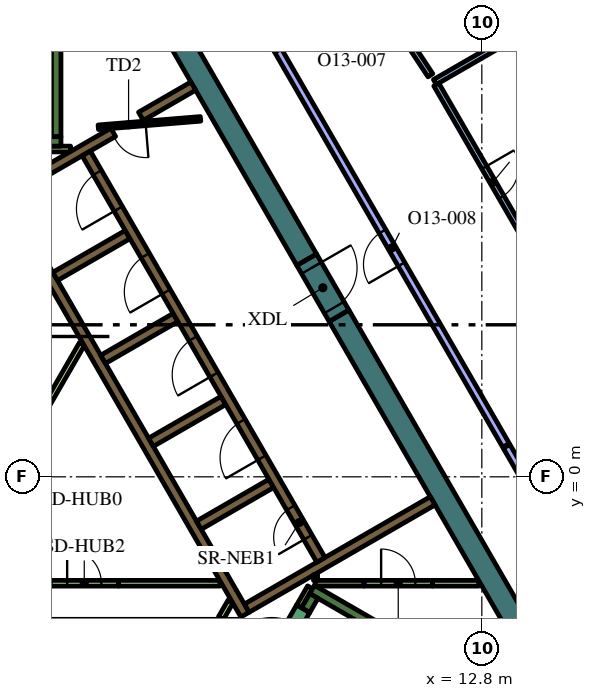
"""IFC4 building model, lengths in metres.
Left out: names, types, materials, properties, quantities, classifications, styles, units other than length and angle.
Written with IfcOpenShell. Run it as: python <this file> out.ifc"""

import sys

from ifc_helpers import new_model, si_unit, direction, frame, frame_2d, origin, place, context, subcontext, project, spatial, polyline, rectangle, outline, extrude, element, fill, save


model = new_model("IFC4")
c1 = context("Model", 3, precision=1e-05, world=origin(), true_north=direction((0.0, 1.0)))
c2 = subcontext(c1, "Body", "Model", "MODEL_VIEW")
j1 = project(units=[si_unit("LENGTHUNIT", "METRE"), si_unit("PLANEANGLEUNIT", "RADIAN")], contexts=[c1])
p1 = place(None, origin())
s1 = spatial("IfcSite", under=j1, at=p1, CompositionType="ELEMENT")
p2 = place(p1, origin())
s2 = spatial("IfcBuilding", under=s1, at=p2, CompositionType="ELEMENT")
p3 = place(p2, frame((0.0, 0.0, 292.2)))
s3 = spatial("IfcBuildingStorey", under=s2, at=p3, CompositionType="ELEMENT", Elevation=292.2)
for number, where, z_axis, x_axis in (
    (1, (9.042, 4.239, 0.0), (0.0, 0.0, 1.0), (0.5, -0.866, 0.0)),
    (2, (1.989, 16.456, 0.0), (0.0, 0.0, 1.0), (0.5, -0.866, 0.0)),
):
    element("IfcWall", number, at=place(p3, frame(where, z_axis=z_axis, x_axis=x_axis)), inside=s3, PredefinedType="SOLIDWALL", context=c2, shape_type="SweptSolid", body=[
        extrude(rectangle(XDim=12.406, YDim=0.6, at=frame_2d((6.203, 0.0))), origin(), (0.0, 0.0, 1.0), 4.2),
    ])
p4 = place(p3, frame((8.334, -2.964, 0.0), z_axis=(0.0, 0.0, 1.0), x_axis=(0.866016039709, -0.500016218704, 0.0)))
e3 = element("IfcWall", 3, at=p4, inside=s3, PredefinedType="SOLIDWALL", context=c2, shape_type="SweptSolid", body=[
    extrude(rectangle(XDim=7.05, YDim=0.25, at=frame_2d((3.525, 0.0))), origin(), (0.0, 0.0, 1.0), 4.2),
])
p5 = place(p3, frame((8.163, -3.511, 0.0), z_axis=(0.0, 0.0, 1.0), x_axis=(0.500127794843, 0.865951608824, 0.0)))
e4 = element("IfcWall", 4, at=p5, inside=s3, PredefinedType="SOLIDWALL", context=c2, shape_type="SweptSolid", body=[
    extrude(rectangle(XDim=0.435, YDim=0.25, at=frame_2d((0.217, 0.0))), origin(), (0.0, 0.0, 1.0), 4.2),
])
p6 = place(p3, frame((1.6, 8.95, 0.0), z_axis=(0.0, 0.0, 1.0), x_axis=(0.0, 1.0, 0.0)))
e5 = element("IfcWall", 5, at=p6, inside=s3, PredefinedType="SOLIDWALL", context=c2, shape_type="SweptSolid", body=[
    extrude(rectangle(XDim=6.8, YDim=0.25, at=frame_2d((3.4, 0.0))), origin(), (0.0, 0.0, 1.0), 4.2),
])
p7 = place(p3, frame((1.05, 8.825, 0.0), z_axis=(0.0, 0.0, 1.0), x_axis=(1.0, 0.0, 0.0)))
e6 = element("IfcWall", 6, at=p7, inside=s3, PredefinedType="SOLIDWALL", context=c2, shape_type="SweptSolid", body=[
    extrude(rectangle(XDim=0.675, YDim=0.25, at=frame_2d((0.337, 0.0))), origin(), (0.0, 0.0, 1.0), 4.2),
])
p8 = place(p3, origin())
e7 = element("IfcWall", 7, at=p8, inside=s3, PredefinedType="SOLIDWALL", context=c2, shape_type="SweptSolid", body=[
    extrude(outline(polyline([(0.332, 6.925), (0.335, 6.925), (0.335, 6.925), (0.335, 6.925), (0.335, 7.075), (0.335, 7.075), (0.335, 7.075), (0.245, 7.075), (0.035, 7.439), (0.252, 7.564), (0.377, 7.348), (1.512, 5.382), (1.637, 5.165), (2.221, 4.153), (2.771, 3.199), (2.896, 2.983), (3.138, 2.564), (4.031, 1.017), (4.156, 0.801), (5.292, -1.165), (5.417, -1.382), (6.073, -2.519), (6.552, -3.348), (6.677, -3.564), (6.46, -3.689), (0.332, 6.925)])), origin(), (0.0, 0.0, 1.0), 4.2),
])
p9 = place(p3, frame((3.1, 9.064, 0.0), z_axis=(0.0, 0.0, 1.0), x_axis=(-0.866030133475, -0.499991807846, 0.0)))
e8 = element("IfcWall", 8, at=p9, inside=s3, PredefinedType="SOLIDWALL", context=c2, shape_type="SweptSolid", body=[
    extrude(rectangle(XDim=3.217, YDim=0.25, at=frame_2d((1.608, 0.0))), origin(), (0.0, 0.0, 1.0), 4.2),
])
p10 = place(p3, frame((1.574, 5.274, 0.0), z_axis=(0.0, 0.0, 1.0), x_axis=(0.866028486751, 0.499994660107, 0.0)))
e9 = element("IfcWall", 9, at=p10, inside=s3, PredefinedType="SOLIDWALL", context=c2, shape_type="SweptSolid", body=[
    extrude(rectangle(XDim=2.2, YDim=0.25, at=frame_2d((1.1, 0.0))), origin(), (0.0, 0.0, 1.0), 4.2),
])
for number, where, z_axis, x_axis in (
    (10, (2.834, 3.091, 0.0), (0.0, 0.0, 1.0), (0.866, 0.5, 0.0)),
    (11, (4.094, 0.909, 0.0), (0.0, 0.0, 1.0), (0.866, 0.5, 0.0)),
    (12, (5.354, -1.274, 0.0), (0.0, 0.0, 1.0), (0.866, 0.5, 0.0)),
):
    element("IfcWall", number, at=place(p3, frame(where, z_axis=z_axis, x_axis=x_axis)), inside=s3, PredefinedType="SOLIDWALL", context=c2, shape_type="SweptSolid", body=[
        extrude(rectangle(XDim=2.2, YDim=0.25, at=frame_2d((1.1, 0.0))), origin(), (0.0, 0.0, 1.0), 4.2),
    ])
p11 = place(p3, frame((11.507, -0.631, 0.0), z_axis=(0.0, 0.0, 1.0), x_axis=(-0.866011447264, -0.500024172624, 0.0)))
e13 = element("IfcWall", 13, at=p11, inside=s3, PredefinedType="SOLIDWALL", context=c2, shape_type="SweptSolid", body=[
    extrude(rectangle(XDim=5.65, YDim=0.25, at=frame_2d((2.825, 0.0))), origin(), (0.0, 0.0, 1.0), 4.2),
])
p12 = place(p3, frame((3.83, 9.486, 0.0), z_axis=(0.0, 0.0, 1.0), x_axis=(0.865986202621, 0.500067892261, 0.0)))
e14 = element("IfcWall", 14, at=p12, inside=s3, PredefinedType="SOLIDWALL", context=c2, shape_type="SweptSolid", body=[
    extrude(rectangle(XDim=1.591, YDim=0.25, at=frame_2d((0.795, 0.0))), origin(), (0.0, 0.0, 1.0), 4.2),
])
for number, where, z_axis, x_axis in (
    (15, (0.941, 1.179, 0.0), (0.0, 0.0, 1.0), (0.5, 0.866, 0.0)),
    (16, (3.238, -2.8, 0.0), (0.0, 0.0, 1.0), (1.0, 0.0, 0.0)),
):
    element("IfcWall", number, at=place(p3, frame(where, z_axis=z_axis, x_axis=x_axis)), inside=s3, PredefinedType="PARTITIONING", context=c2, shape_type="SweptSolid", body=[
        extrude(rectangle(XDim=2.672, YDim=0.15, at=frame_2d((1.336, 0.0))), origin(), (0.0, 0.0, 1.0), 3.55),
    ])
p13 = place(p3, frame((1.05, 8.625, 0.0), z_axis=(0.0, 0.0, 1.0), x_axis=(1.0, 0.0, 0.0)))
e17 = element("IfcWall", 17, at=p13, inside=s3, PredefinedType="PARTITIONING", context=c2, shape_type="SweptSolid", body=[
    extrude(rectangle(XDim=0.929, YDim=0.15, at=frame_2d((0.464, 0.0))), origin(), (0.0, 0.0, 1.0), 3.55),
])
p14 = place(p3, frame((8.412, -2.8, 0.0), z_axis=(0.0, 0.0, 1.0), x_axis=(1.0, 0.0, 0.0)))
e18 = element("IfcWall", 18, at=p14, inside=s3, PredefinedType="PARTITIONING", context=c2, shape_type="SweptSolid", body=[
    extrude(rectangle(XDim=1.288, YDim=0.15, at=frame_2d((0.644, 0.0))), origin(), (0.0, 0.0, 1.0), 4.2),
])
p15 = place(p3, frame((8.37, -2.65, 0.0), z_axis=(0.0, 0.0, 1.0), x_axis=(1.0, 0.0, 0.0)))
e19 = element("IfcWall", 19, at=p15, inside=s3, PredefinedType="PARTITIONING", context=c2, shape_type="SweptSolid", body=[
    extrude(rectangle(XDim=0.108, YDim=0.15, at=frame_2d((0.054, 0.0))), origin(), (0.0, 0.0, 1.0), 4.2),
])
p16 = place(p3, frame((8.281, -2.907, 0.0), z_axis=(0.0, 0.0, 1.0), x_axis=(-0.500193841991, -0.86591346013, 0.0)))
e20 = element("IfcWall", 20, at=p16, inside=s3, PredefinedType="PARTITIONING", context=c2, shape_type="SweptSolid", body=[
    extrude(rectangle(XDim=0.583, YDim=0.15, at=frame_2d((0.292, 0.0))), origin(), (0.0, 0.0, 1.0), 4.2),
])
p17 = place(p3, frame((11.5, -2.801, 0.0), z_axis=(0.0, 0.0, 1.0), x_axis=(1.0, 0.0, 0.0)))
e21 = element("IfcWall", 21, at=p17, inside=s3, PredefinedType="PARTITIONING", context=c2, shape_type="SweptSolid", body=[
    extrude(rectangle(XDim=1.222, YDim=0.15, at=frame_2d((0.611, 0.0))), origin(), (0.0, 0.0, 1.0), 3.55),
])
p18 = place(p3, frame((5.936, -3.718, 0.0), z_axis=(0.0, 0.0, 1.0), x_axis=(0.499890179513, 0.866088799389, 0.0)))
e22 = element("IfcWall", 22, at=p18, inside=s3, PredefinedType="PARTITIONING", context=c2, shape_type="SweptSolid", body=[
    extrude(rectangle(XDim=0.504, YDim=0.15, at=frame_2d((0.252, 0.0))), origin(), (0.0, 0.0, 1.0), 3.55),
])
p19 = place(p3, frame((8.565, -2.185, 0.0), z_axis=(0.0, 0.0, 1.0), x_axis=(-0.499997954832, 0.866026584559, 0.0)))
e23 = element("IfcWall", 23, at=p19, inside=s3, PredefinedType="SOLIDWALL", context=c2, shape_type="SweptSolid", body=[
    extrude(rectangle(XDim=12.35, YDim=0.25, at=frame_2d((6.175, 0.0))), origin(), (0.0, 0.0, 1.0), 4.2),
])
p20 = place(p19, frame((0.685, 0.0, 0.0)))
e24 = element("IfcOpeningElement", 24, at=p20, cuts=e23, PredefinedType="OPENING", context=c2, shape_type="SweptSolid", body=[
    extrude(rectangle(XDim=0.9, YDim=2.1, at=frame_2d((0.45, 1.05))), frame((0.0, 0.135, 0.0), z_axis=(0.0, -1.0, 0.0), x_axis=(1.0, 0.0, 0.0)), (0.0, 0.0, 1.0), 0.27),
])
p21 = place(p19, frame((3.105, 0.0, 0.0)))
e25 = element("IfcOpeningElement", 25, at=p21, cuts=e23, PredefinedType="OPENING", context=c2, shape_type="SweptSolid", body=[
    extrude(rectangle(XDim=1.1, YDim=2.1, at=frame_2d((0.55, 1.05))), frame((0.0, 0.135, 0.0), z_axis=(0.0, -1.0, 0.0), x_axis=(1.0, 0.0, 0.0)), (0.0, 0.0, 1.0), 0.27),
])
p22 = place(p19, frame((5.625, 0.0, 0.0)))
e26 = element("IfcOpeningElement", 26, at=p22, cuts=e23, PredefinedType="OPENING", context=c2, shape_type="SweptSolid", body=[
    extrude(rectangle(XDim=1.1, YDim=2.1, at=frame_2d((0.55, 1.05))), frame((0.0, 0.135, 0.0), z_axis=(0.0, -1.0, 0.0), x_axis=(1.0, 0.0, 0.0)), (0.0, 0.0, 1.0), 0.27),
])
p23 = place(p19, frame((8.145, 0.0, 0.0)))
e27 = element("IfcOpeningElement", 27, at=p23, cuts=e23, PredefinedType="OPENING", context=c2, shape_type="SweptSolid", body=[
    extrude(rectangle(XDim=1.1, YDim=2.1, at=frame_2d((0.55, 1.05))), frame((0.0, 0.135, 0.0), z_axis=(0.0, -1.0, 0.0), x_axis=(1.0, 0.0, 0.0)), (0.0, 0.0, 1.0), 0.27),
])
p24 = place(p19, frame((10.665, 0.0, 0.0)))
e28 = element("IfcOpeningElement", 28, at=p24, cuts=e23, PredefinedType="OPENING", context=c2, shape_type="SweptSolid", body=[
    extrude(rectangle(XDim=1.1, YDim=2.1, at=frame_2d((0.55, 1.05))), frame((0.0, 0.135, 0.0), z_axis=(0.0, -1.0, 0.0), x_axis=(1.0, 0.0, 0.0)), (0.0, 0.0, 1.0), 0.27),
])
p25 = place(p3, frame((7.048, -5.292, 0.0), z_axis=(0.0, 0.0, 1.0), x_axis=(0.49994051562, 0.866059744384, 0.0)))
e29 = element("IfcWall", 29, at=p25, inside=s3, PredefinedType="SOLIDWALL", context=c2, shape_type="SweptSolid", body=[
    extrude(rectangle(XDim=2.1, YDim=0.4, at=frame_2d((1.05, 0.0))), origin(), (0.0, 0.0, 1.0), 4.2),
])
p26 = place(p25, frame((0.45, 0.0, 0.0)))
e30 = element("IfcOpeningElement", 30, at=p26, cuts=e29, PredefinedType="OPENING", context=c2, shape_type="SweptSolid", body=[
    extrude(rectangle(XDim=1.2, YDim=2.1, at=frame_2d((0.6, 1.05))), frame((0.0, 0.21, 0.0), z_axis=(0.0, -1.0, 0.0), x_axis=(1.0, 0.0, 0.0)), (0.0, 0.0, 1.0), 0.42),
])
p27 = place(p3, frame((5.398, 9.419, 0.0), z_axis=(0.0, 0.0, 1.0), x_axis=(-0.996653416376, -0.081743303248, 0.0)))
e31 = element("IfcWall", 31, at=p27, inside=s3, PredefinedType="PARTITIONING", context=c2, shape_type="SweptSolid", body=[
    extrude(rectangle(XDim=2.7, YDim=0.12, at=frame_2d((1.35, 0.0))), origin(), (0.0, 0.0, 1.0), 3.55),
])
p28 = place(p27, frame((1.45, 0.0, 0.0)))
e32 = element("IfcOpeningElement", 32, at=p28, cuts=e31, PredefinedType="OPENING", context=c2, shape_type="SweptSolid", body=[
    extrude(rectangle(XDim=0.9, YDim=2.1, at=frame_2d((0.45, 1.05))), frame((0.0, 0.07, 0.0), z_axis=(0.0, -1.0, 0.0), x_axis=(1.0, 0.0, 0.0)), (0.0, 0.0, 1.0), 0.14),
])
p29 = place(p3, frame((8.192, 5.711, 0.0), z_axis=(0.0, 0.0, 1.0), x_axis=(0.500062241894, -0.865989465428, 0.0)))
e33 = element("IfcWall", 33, at=p29, inside=s3, PredefinedType="SOLIDWALL", context=c2, shape_type="SweptSolid", body=[
    extrude(rectangle(XDim=1.7, YDim=0.6, at=frame_2d((0.85, 0.0))), origin(), (0.0, 0.0, 1.0), 4.2),
])
p30 = place(p29, frame((0.25, 0.0, 0.0)))
e34 = element("IfcOpeningElement", 34, at=p30, cuts=e33, PredefinedType="OPENING", context=c2, shape_type="SweptSolid", body=[
    extrude(rectangle(XDim=1.2, YDim=2.1, at=frame_2d((0.6, 1.05))), frame((0.0, 0.31, 0.0), z_axis=(0.0, -1.0, 0.0), x_axis=(1.0, 0.0, 0.0)), (0.0, 0.0, 1.0), 0.62),
])
p31 = place(p3, frame((1.438, -2.8, 0.0), z_axis=(0.0, 0.0, 1.0), x_axis=(1.0, 0.0, 0.0)))
e35 = element("IfcWall", 35, at=p31, inside=s3, PredefinedType="PARTITIONING", context=c2, shape_type="SweptSolid", body=[
    extrude(rectangle(XDim=1.8, YDim=0.15, at=frame_2d((0.9, 0.0))), origin(), (0.0, 0.0, 1.0), 3.55),
])
p32 = place(p31, frame((0.45, 0.0, 0.0)))
e36 = element("IfcOpeningElement", 36, at=p32, cuts=e35, PredefinedType="OPENING", context=c2, shape_type="SweptSolid", body=[
    extrude(rectangle(XDim=0.9, YDim=2.1, at=frame_2d((0.45, 1.05))), frame((0.0, 0.085, 0.0), z_axis=(0.0, -1.0, 0.0), x_axis=(1.0, 0.0, 0.0)), (0.0, 0.0, 1.0), 0.17),
])
p33 = place(p3, frame((9.7, -2.8, 0.0), z_axis=(0.0, 0.0, 1.0), x_axis=(1.0, 0.0, 0.0)))
e37 = element("IfcWall", 37, at=p33, inside=s3, PredefinedType="PARTITIONING", context=c2, shape_type="SweptSolid", body=[
    extrude(rectangle(XDim=1.8, YDim=0.15, at=frame_2d((0.9, 0.0))), origin(), (0.0, 0.0, 1.0), 3.55),
])
p34 = place(p33, frame((0.45, 0.0, 0.0)))
e38 = element("IfcOpeningElement", 38, at=p34, cuts=e37, PredefinedType="OPENING", context=c2, shape_type="SweptSolid", body=[
    extrude(rectangle(XDim=0.9, YDim=2.1, at=frame_2d((0.45, 1.05))), frame((0.0, 0.085, 0.0), z_axis=(0.0, -1.0, 0.0), x_axis=(1.0, 0.0, 0.0)), (0.0, 0.0, 1.0), 0.17),
])
p35 = place(p3, frame((11.564, 10.387, 0.0), z_axis=(0.0, 0.0, 1.0), x_axis=(0.86604641216, 0.499963610661, 0.0)))
e39 = element("IfcWall", 39, at=p35, inside=s3, PredefinedType="PARTITIONING", context=c2, shape_type="SweptSolid", body=[
    extrude(rectangle(XDim=3.096, YDim=0.15, at=frame_2d((1.548, 0.0))), origin(), (0.0, 0.0, 1.0), 3.55),
])
p36 = place(p3, frame((11.602, 10.322, 0.0), z_axis=(0.0, 0.0, 1.0), x_axis=(0.500961140821, -0.865469777281, 0.0)))
e40 = element("IfcWall", 40, at=p36, inside=s3, PredefinedType="PARTITIONING", context=c2, shape_type="SweptSolid", body=[
    extrude(rectangle(XDim=6.021, YDim=0.15, at=frame_2d((3.01, 0.0))), origin(), (0.0, 0.0, 1.0), 3.55),
])
p37 = place(p36, frame((2.521, 0.0, 0.0)))
e41 = element("IfcOpeningElement", 41, at=p37, cuts=e40, PredefinedType="OPENING", context=c2, shape_type="SweptSolid", body=[
    extrude(rectangle(XDim=0.9, YDim=2.1, at=frame_2d((0.45, 1.05))), frame((0.0, 0.085, 0.0), z_axis=(0.0, -1.0, 0.0), x_axis=(1.0, 0.0, 0.0)), (0.0, 0.0, 1.0), 0.17),
])
p38 = place(p3, frame((9.795, 13.068, 0.0), z_axis=(0.0, 0.0, 1.0), x_axis=(0.550767347659, -0.834658809786, 0.0)))
e42 = element("IfcWall", 42, at=p38, inside=s3, PredefinedType="PARTITIONING", context=c2, shape_type="SweptSolid", body=[
    extrude(rectangle(XDim=2.999, YDim=0.15, at=frame_2d((1.5, 0.0))), origin(), (0.0, 0.0, 1.0), 3.55),
])
p39 = place(p38, frame((1.099, 0.0, 0.0)))
e43 = element("IfcOpeningElement", 43, at=p39, cuts=e42, PredefinedType="OPENING", context=c2, shape_type="SweptSolid", body=[
    extrude(rectangle(XDim=0.9, YDim=2.1, at=frame_2d((0.45, 1.05))), frame((0.0, 0.085, 0.0), z_axis=(0.0, -1.0, 0.0), x_axis=(1.0, 0.0, 0.0)), (0.0, 0.0, 1.0), 0.17),
])
p40 = place(p3, frame((13.436, 0.829, 0.0), z_axis=(0.0, 0.0, 1.0), x_axis=(-0.49999894854, 0.866026010844, 0.0)))
e44 = element("IfcWall", 44, at=p40, inside=s3, PredefinedType="PARTITIONING", context=c2, shape_type="SweptSolid", body=[
    extrude(rectangle(XDim=12.0, YDim=0.2, at=frame_2d((6.0, 0.0))), origin(), (0.0, 0.0, 1.0), 3.55),
])
p41 = place(p40, frame((5.5, 0.0, 0.0)))
e45 = element("IfcOpeningElement", 45, at=p41, cuts=e44, PredefinedType="OPENING", context=c2, shape_type="SweptSolid", body=[
    extrude(rectangle(XDim=1.0, YDim=2.1, at=frame_2d((0.5, 1.05))), frame((0.0, 0.11, 0.0), z_axis=(0.0, -1.0, 0.0), x_axis=(1.0, 0.0, 0.0)), (0.0, 0.0, 1.0), 0.22),
])
p42 = place(p3, frame((17.565, -6.324, 0.0), z_axis=(0.0, 0.0, 1.0), x_axis=(-0.499977548053, 0.866038366034, 0.0)))
e46 = element("IfcWall", 46, at=p42, inside=s3, PredefinedType="PARTITIONING", context=c2, shape_type="SweptSolid", body=[
    extrude(rectangle(XDim=8.229, YDim=0.2, at=frame_2d((4.115, 0.0))), origin(), (0.0, 0.0, 1.0), 3.55),
])
p43 = place(p20, origin())
e47 = element("IfcDoor", 47, at=p43, inside=s3, OperationType="SINGLE_SWING_LEFT", PredefinedType="DOOR", context=c2, shape_type="SweptSolid", body=[
    extrude(rectangle(XDim=0.9, YDim=2.1, at=frame_2d((0.45, 1.05))), frame((0.0, 0.025, 0.0), z_axis=(0.0, -1.0, 0.0), x_axis=(1.0, 0.0, 0.0)), (0.0, 0.0, 1.0), 0.05),
])
fill(e24, e47)
p44 = place(p21, origin())
e48 = element("IfcDoor", 48, at=p44, inside=s3, OperationType="DOUBLE_DOOR_SLIDING", PredefinedType="DOOR", context=c2, shape_type="SweptSolid", body=[
    extrude(rectangle(XDim=1.1, YDim=2.1, at=frame_2d((0.55, 1.05))), frame((0.0, 0.025, 0.0), z_axis=(0.0, -1.0, 0.0), x_axis=(1.0, 0.0, 0.0)), (0.0, 0.0, 1.0), 0.05),
])
fill(e25, e48)
p45 = place(p22, origin())
e49 = element("IfcDoor", 49, at=p45, inside=s3, OperationType="DOUBLE_DOOR_SLIDING", PredefinedType="DOOR", context=c2, shape_type="SweptSolid", body=[
    extrude(rectangle(XDim=1.1, YDim=2.1, at=frame_2d((0.55, 1.05))), frame((0.0, 0.025, 0.0), z_axis=(0.0, -1.0, 0.0), x_axis=(1.0, 0.0, 0.0)), (0.0, 0.0, 1.0), 0.05),
])
fill(e26, e49)
p46 = place(p23, origin())
e50 = element("IfcDoor", 50, at=p46, inside=s3, OperationType="DOUBLE_DOOR_SLIDING", PredefinedType="DOOR", context=c2, shape_type="SweptSolid", body=[
    extrude(rectangle(XDim=1.1, YDim=2.1, at=frame_2d((0.55, 1.05))), frame((0.0, 0.025, 0.0), z_axis=(0.0, -1.0, 0.0), x_axis=(1.0, 0.0, 0.0)), (0.0, 0.0, 1.0), 0.05),
])
fill(e27, e50)
p47 = place(p24, origin())
e51 = element("IfcDoor", 51, at=p47, inside=s3, OperationType="DOUBLE_DOOR_SLIDING", PredefinedType="DOOR", context=c2, shape_type="SweptSolid", body=[
    extrude(rectangle(XDim=1.1, YDim=2.1, at=frame_2d((0.55, 1.05))), frame((0.0, 0.025, 0.0), z_axis=(0.0, -1.0, 0.0), x_axis=(1.0, 0.0, 0.0)), (0.0, 0.0, 1.0), 0.05),
])
fill(e28, e51)
p48 = place(p28, origin())
e52 = element("IfcDoor", 52, at=p48, inside=s3, OperationType="SINGLE_SWING_LEFT", PredefinedType="DOOR", context=c2, shape_type="SweptSolid", body=[
    extrude(rectangle(XDim=0.9, YDim=2.1, at=frame_2d((0.45, 1.05))), frame((0.0, 0.025, 0.0), z_axis=(0.0, -1.0, 0.0), x_axis=(1.0, 0.0, 0.0)), (0.0, 0.0, 1.0), 0.05),
])
fill(e32, e52)
p49 = place(p30, origin())
e53 = element("IfcDoor", 53, at=p49, inside=s3, OperationType="SINGLE_SWING_LEFT", PredefinedType="DOOR", context=c2, shape_type="SweptSolid", body=[
    extrude(rectangle(XDim=1.2, YDim=2.1, at=frame_2d((0.6, 1.05))), frame((0.0, 0.025, 0.0), z_axis=(0.0, -1.0, 0.0), x_axis=(1.0, 0.0, 0.0)), (0.0, 0.0, 1.0), 0.05),
])
fill(e34, e53)
p50 = place(p32, origin())
e54 = element("IfcDoor", 54, at=p50, inside=s3, OperationType="SINGLE_SWING_LEFT", PredefinedType="DOOR", context=c2, shape_type="SweptSolid", body=[
    extrude(rectangle(XDim=0.9, YDim=2.1, at=frame_2d((0.45, 1.05))), frame((0.0, 0.025, 0.0), z_axis=(0.0, -1.0, 0.0), x_axis=(1.0, 0.0, 0.0)), (0.0, 0.0, 1.0), 0.05),
])
fill(e36, e54)
p51 = place(p34, origin())
e55 = element("IfcDoor", 55, at=p51, inside=s3, OperationType="SINGLE_SWING_LEFT", PredefinedType="DOOR", context=c2, shape_type="SweptSolid", body=[
    extrude(rectangle(XDim=0.9, YDim=2.1, at=frame_2d((0.45, 1.05))), frame((0.0, 0.025, 0.0), z_axis=(0.0, -1.0, 0.0), x_axis=(1.0, 0.0, 0.0)), (0.0, 0.0, 1.0), 0.05),
])
fill(e38, e55)
p52 = place(p37, origin())
e56 = element("IfcDoor", 56, at=p52, inside=s3, OperationType="SINGLE_SWING_LEFT", PredefinedType="DOOR", context=c2, shape_type="SweptSolid", body=[
    extrude(rectangle(XDim=0.9, YDim=2.1, at=frame_2d((0.45, 1.05))), frame((0.0, 0.025, 0.0), z_axis=(0.0, -1.0, 0.0), x_axis=(1.0, 0.0, 0.0)), (0.0, 0.0, 1.0), 0.05),
])
fill(e41, e56)
p53 = place(p41, origin())
e57 = element("IfcDoor", 57, at=p53, inside=s3, OperationType="SINGLE_SWING_RIGHT", PredefinedType="DOOR", context=c2, shape_type="SweptSolid", body=[
    extrude(rectangle(XDim=1.0, YDim=2.1, at=frame_2d((0.5, 1.05))), frame((0.0, 0.025, 0.0), z_axis=(0.0, -1.0, 0.0), x_axis=(1.0, 0.0, 0.0)), (0.0, 0.0, 1.0), 0.05),
])
fill(e45, e57)
save(model, sys.argv[1])
